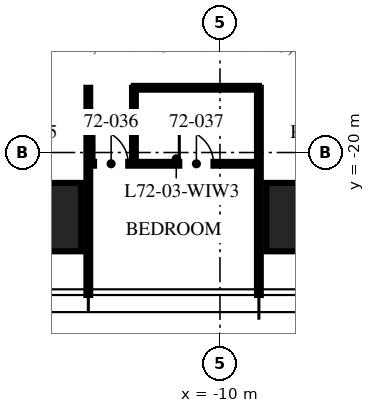
"""IFC4 building model, lengths in metres.
Left out: names, types, materials, properties, quantities, classifications, styles, units other than length and angle.
Written with IfcOpenShell. Run it as: python <this file> out.ifc"""

import sys

from ifc_helpers import new_model, si_unit, direction, frame, frame_2d, origin, origin_2d, place, context, subcontext, project, spatial, rectangle, extrude, element, fill, save


model = new_model("IFC4")
c1 = context("Model", 3, precision=1e-05, world=origin(), true_north=direction((0.0, 1.0)))
c2 = subcontext(c1, "Body", "Model", "MODEL_VIEW")
j1 = project(units=[si_unit("LENGTHUNIT", "METRE"), si_unit("PLANEANGLEUNIT", "RADIAN")], contexts=[c1])
p1 = place(None, origin())
s1 = spatial("IfcSite", under=j1, at=p1, CompositionType="ELEMENT")
p2 = place(p1, origin())
s2 = spatial("IfcBuilding", under=s1, at=p2, CompositionType="ELEMENT")
p3 = place(p2, frame((0.0, 0.0, 289.5)))
s3 = spatial("IfcBuildingStorey", under=s2, at=p3, CompositionType="ELEMENT", Elevation=289.5)
for number, where, z_axis, x_axis in (
    (1, (-7.48, -21.7, 0.0), (0.0, 0.0, 1.0), (1.0, 0.0, 0.0)),
    (2, (-14.96, -21.7, 0.0), (0.0, 0.0, 1.0), (1.0, 0.0, 0.0)),
):
    element("IfcColumn", number, at=place(p3, frame(where, z_axis=z_axis, x_axis=x_axis)), inside=s3, PredefinedType="COLUMN", context=c2, shape_type="SweptSolid", body=[
        extrude(rectangle(XDim=2.6, YDim=1.8, at=origin_2d()), origin(), (0.0, 0.0, 1.0), 3.75),
    ])
for number, where, z_axis, x_axis in (
    (3, (-13.464, -18.296, 0.0), (0.0, 0.0, 1.0), (0.0, -1.0, 0.0)),
    (4, (-8.976, -18.296, 0.0), (0.0, 0.0, 1.0), (0.0, -1.0, 0.0)),
):
    element("IfcWall", number, at=place(p3, frame(where, z_axis=z_axis, x_axis=x_axis)), inside=s3, PredefinedType="PARTITIONING", context=c2, shape_type="SweptSolid", body=[
        extrude(rectangle(XDim=5.454, YDim=0.1, at=frame_2d((2.727, 0.0))), origin(), (0.0, 0.0, 1.0), 3.01),
    ])
p4 = place(p3, frame((-13.464, -20.296, 0.0), z_axis=(0.0, 0.0, 1.0), x_axis=(1.0, 0.0, 0.0)))
e5 = element("IfcWall", 5, at=p4, inside=s3, PredefinedType="PARTITIONING", context=c2, shape_type="SweptSolid", body=[
    extrude(rectangle(XDim=4.488, YDim=0.1, at=frame_2d((2.244, 0.0))), origin(), (0.0, 0.0, 1.0), 2.91),
])
p5 = place(p4, frame((0.15, 0.0, 0.0)))
e6 = element("IfcOpeningElement", 6, at=p5, cuts=e5, PredefinedType="OPENING", context=c2, shape_type="SweptSolid", body=[
    extrude(rectangle(XDim=0.9, YDim=2.1, at=frame_2d((0.45, 1.05))), frame((0.0, 0.06, 0.0), z_axis=(0.0, -1.0, 0.0), x_axis=(1.0, 0.0, 0.0)), (0.0, 0.0, 1.0), 0.12),
])
p6 = place(p4, frame((2.394, 0.0, 0.0)))
e7 = element("IfcOpeningElement", 7, at=p6, cuts=e5, PredefinedType="OPENING", context=c2, shape_type="SweptSolid", body=[
    extrude(rectangle(XDim=0.9, YDim=2.1, at=frame_2d((0.45, 1.05))), frame((0.0, 0.06, 0.0), z_axis=(0.0, -1.0, 0.0), x_axis=(1.0, 0.0, 0.0)), (0.0, 0.0, 1.0), 0.12),
])
p7 = place(p3, frame((-12.264, -18.296, 0.0), z_axis=(0.0, 0.0, 1.0), x_axis=(0.0, -1.0, 0.0)))
e8 = element("IfcWall", 8, at=p7, inside=s3, PredefinedType="PARTITIONING", context=c2, shape_type="SweptSolid", body=[
    extrude(rectangle(XDim=2.0, YDim=0.1, at=frame_2d((1.0, 0.0))), origin(), (0.0, 0.0, 1.0), 3.5),
])
p8 = place(p3, frame((-12.264, -18.296, 0.0), z_axis=(0.0, 0.0, 1.0), x_axis=(1.0, 0.0, 0.0)))
e9 = element("IfcWall", 9, at=p8, inside=s3, PredefinedType="PARTITIONING", context=c2, shape_type="SweptSolid", body=[
    extrude(rectangle(XDim=3.288, YDim=0.1, at=frame_2d((1.644, 0.0))), origin(), (0.0, 0.0, 1.0), 2.91),
])
p9 = place(p5, origin())
e10 = element("IfcDoor", 10, at=p9, inside=s3, OperationType="SINGLE_SWING_LEFT", PredefinedType="DOOR", context=c2, shape_type="SweptSolid", body=[
    extrude(rectangle(XDim=0.9, YDim=2.1, at=frame_2d((0.45, 1.05))), frame((0.0, 0.025, 0.0), z_axis=(0.0, -1.0, 0.0), x_axis=(1.0, 0.0, 0.0)), (0.0, 0.0, 1.0), 0.05),
])
fill(e6, e10)
p10 = place(p6, origin())
e11 = element("IfcDoor", 11, at=p10, inside=s3, OperationType="SINGLE_SWING_LEFT", PredefinedType="DOOR", context=c2, shape_type="SweptSolid", body=[
    extrude(rectangle(XDim=0.9, YDim=2.1, at=frame_2d((0.45, 1.05))), frame((0.0, 0.025, 0.0), z_axis=(0.0, -1.0, 0.0), x_axis=(1.0, 0.0, 0.0)), (0.0, 0.0, 1.0), 0.05),
])
fill(e7, e11)
save(model, sys.argv[1])
